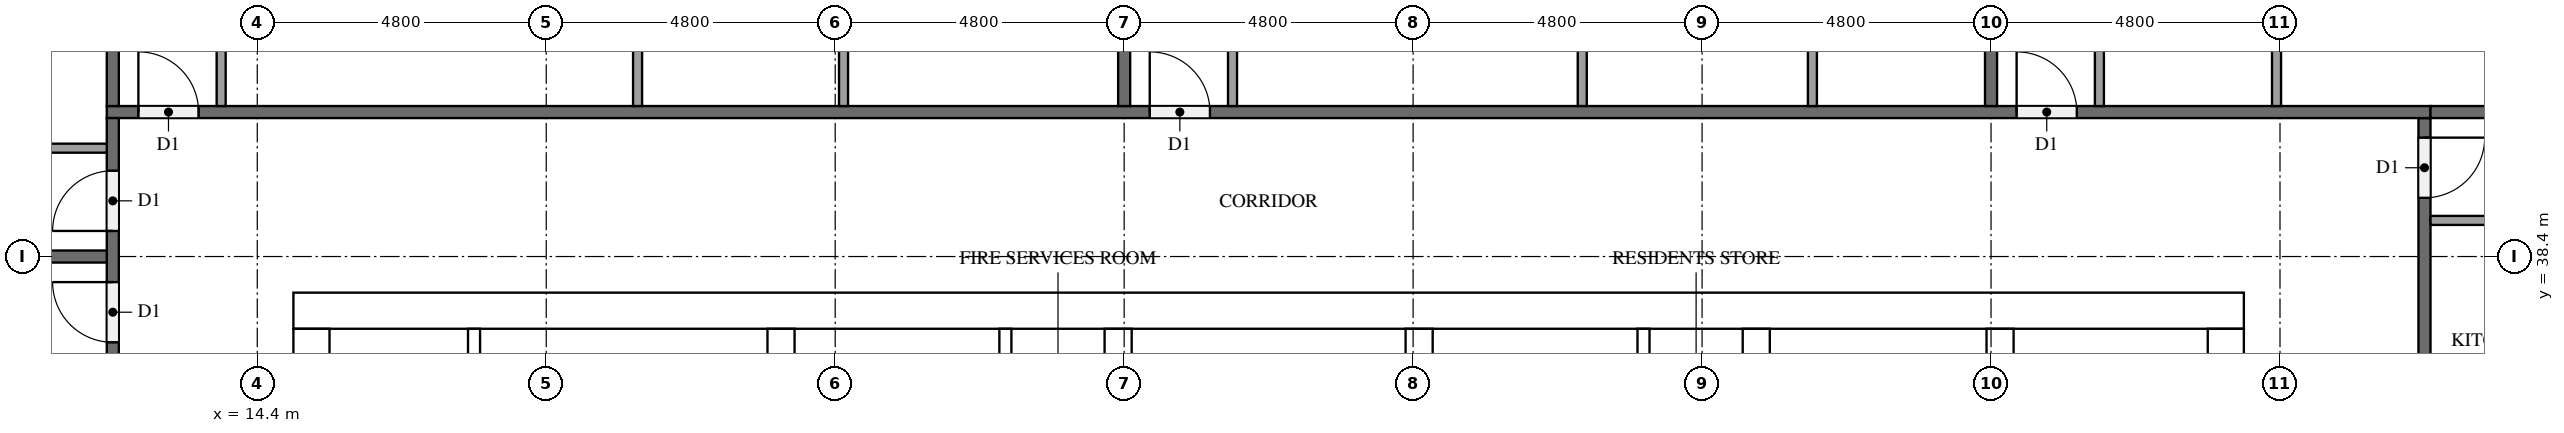
"""IFC4 building model, lengths in metres.
Left out: names, types, materials, properties, quantities, classifications, styles, units other than length and angle.
Written with IfcOpenShell. Run it as: python <this file> out.ifc"""

import sys

from ifc_helpers import new_model, si_unit, direction, frame, frame_2d, origin, place, context, subcontext, project, spatial, rectangle, extrude, element, fill, save


model = new_model("IFC4")
c1 = context("Model", 3, precision=1e-05, world=origin(), true_north=direction((0.0, 1.0)))
c2 = subcontext(c1, "Body", "Model", "MODEL_VIEW")
j1 = project(units=[si_unit("LENGTHUNIT", "METRE"), si_unit("PLANEANGLEUNIT", "RADIAN")], contexts=[c1])
p1 = place(None, origin())
s1 = spatial("IfcSite", under=j1, at=p1, CompositionType="ELEMENT")
p2 = place(p1, origin())
s2 = spatial("IfcBuilding", under=s1, at=p2, CompositionType="ELEMENT")
p3 = place(p2, frame((0.0, 0.0, 249.2)))
s3 = spatial("IfcBuildingStorey", under=s2, at=p3, CompositionType="ELEMENT", Elevation=249.2)
p4 = place(p3, frame((15.0, 37.5, 0.0), z_axis=(0.0, 0.0, 1.0), x_axis=(1.0, 0.0, 0.0)))
e1 = element("IfcWall", 1, at=p4, inside=s3, PredefinedType="SHEAR", context=c2, shape_type="SweptSolid", body=[
    extrude(rectangle(XDim=32.4, YDim=0.6, at=frame_2d((16.2, 0.0))), origin(), (0.0, 0.0, 1.0), 3.2),
])
p5 = place(p4, frame((15.3, 0.0, 0.0)))
e2 = element("IfcOpeningElement", 2, at=p5, cuts=e1, PredefinedType="OPENING", context=c2, shape_type="SweptSolid", body=[
    extrude(rectangle(XDim=1.8, YDim=2.1, at=frame_2d((0.9, 1.05))), frame((0.0, 0.31, 0.0), z_axis=(0.0, -1.0, 0.0), x_axis=(1.0, 0.0, 0.0)), (0.0, 0.0, 1.0), 0.62),
])
p6 = place(p4, frame((1.25, 0.0, 0.0)))
e3 = element("IfcOpeningElement", 3, at=p6, cuts=e1, PredefinedType="OPENING", context=c2, shape_type="SweptSolid", body=[
    extrude(rectangle(XDim=1.0, YDim=2.1, at=frame_2d((0.5, 1.05))), frame((0.0, 0.31, 0.0), z_axis=(0.0, -1.0, 0.0), x_axis=(1.0, 0.0, 0.0)), (0.0, 0.0, 1.0), 0.62),
])
p7 = place(p4, frame((4.988, 0.0, 0.0)))
e4 = element("IfcOpeningElement", 4, at=p7, cuts=e1, PredefinedType="OPENING", context=c2, shape_type="SweptSolid", body=[
    extrude(rectangle(XDim=1.0, YDim=2.1, at=frame_2d((0.5, 1.05))), frame((0.0, 0.31, 0.0), z_axis=(0.0, -1.0, 0.0), x_axis=(1.0, 0.0, 0.0)), (0.0, 0.0, 1.0), 0.62),
])
p8 = place(p3, frame((15.3, 15.6, 0.0), z_axis=(0.0, 0.0, 1.0), x_axis=(0.0, 1.0, 0.0)))
e5 = element("IfcWall", 5, at=p8, inside=s3, PredefinedType="SHEAR", context=c2, shape_type="SweptSolid", body=[
    extrude(rectangle(XDim=21.6, YDim=0.6, at=frame_2d((10.8, 0.0))), origin(), (0.0, 0.0, 1.0), 3.2),
])
p9 = place(p8, frame((5.16, 0.0, 0.0)))
e6 = element("IfcOpeningElement", 6, at=p9, cuts=e5, PredefinedType="OPENING", context=c2, shape_type="SweptSolid", body=[
    extrude(rectangle(XDim=1.2, YDim=2.1, at=frame_2d((0.6, 1.05))), frame((0.0, 0.31, 0.0), z_axis=(0.0, -1.0, 0.0), x_axis=(1.0, 0.0, 0.0)), (0.0, 0.0, 1.0), 0.62),
])
p10 = place(p3, frame((47.1, 15.6, 0.0), z_axis=(0.0, 0.0, 1.0), x_axis=(0.0, 1.0, 0.0)))
e7 = element("IfcWall", 7, at=p10, inside=s3, PredefinedType="SHEAR", context=c2, shape_type="SweptSolid", body=[
    extrude(rectangle(XDim=21.6, YDim=0.6, at=frame_2d((10.8, 0.0))), origin(), (0.0, 0.0, 1.0), 3.2),
])
p11 = place(p10, frame((10.5, 0.0, 0.0)))
e8 = element("IfcOpeningElement", 8, at=p11, cuts=e7, PredefinedType="OPENING", context=c2, shape_type="SweptSolid", body=[
    extrude(rectangle(XDim=1.2, YDim=2.1, at=frame_2d((0.6, 1.05))), frame((0.0, 0.31, 0.0), z_axis=(0.0, -1.0, 0.0), x_axis=(1.0, 0.0, 0.0)), (0.0, 0.0, 1.0), 0.62),
])
p12 = place(p3, frame((23.1, 15.6, 0.0), z_axis=(0.0, 0.0, 1.0), x_axis=(0.0, 1.0, 0.0)))
e9 = element("IfcWall", 9, at=p12, inside=s3, PredefinedType="SHEAR", context=c2, shape_type="SweptSolid", body=[
    extrude(rectangle(XDim=21.6, YDim=0.45, at=frame_2d((10.8, 0.0))), origin(), (0.0, 0.0, 1.0), 3.2),
])
p13 = place(p3, frame((39.3, 27.75, 0.0), z_axis=(0.0, 0.0, 1.0), x_axis=(0.0, 1.0, 0.0)))
e10 = element("IfcWall", 10, at=p13, inside=s3, PredefinedType="SHEAR", context=c2, shape_type="SweptSolid", body=[
    extrude(rectangle(XDim=9.45, YDim=0.45, at=frame_2d((4.725, 0.0))), origin(), (0.0, 0.0, 1.0), 3.2),
])
p14 = place(p3, frame((43.35, 27.75, 0.0), z_axis=(0.0, 0.0, 1.0), x_axis=(0.0, 1.0, 0.0)))
e11 = element("IfcWall", 11, at=p14, inside=s3, PredefinedType="SHEAR", context=c2, shape_type="SweptSolid", body=[
    extrude(rectangle(XDim=9.45, YDim=0.45, at=frame_2d((4.725, 0.0))), origin(), (0.0, 0.0, 1.0), 3.2),
])
p15 = place(p14, frame((7.65, 0.0, 0.0)))
e12 = element("IfcOpeningElement", 12, at=p15, cuts=e11, PredefinedType="OPENING", context=c2, shape_type="SweptSolid", body=[
    extrude(rectangle(XDim=1.2, YDim=2.1, at=frame_2d((0.6, 1.05))), frame((0.0, 0.235, 0.0), z_axis=(0.0, -1.0, 0.0), x_axis=(1.0, 0.0, 0.0)), (0.0, 0.0, 1.0), 0.47),
])
for number, where, z_axis, x_axis in (
    (13, (28.7, 33.775, 0.0), (0.0, 0.0, 1.0), (0.0, 1.0, 0.0)),
    (14, (33.7, 33.775, 0.0), (0.0, 0.0, 1.0), (0.0, 1.0, 0.0)),
):
    element("IfcWall", number, at=place(p3, frame(where, z_axis=z_axis, x_axis=x_axis)), inside=s3, PredefinedType="SHEAR", context=c2, shape_type="SweptSolid", body=[
        extrude(rectangle(XDim=3.425, YDim=0.45, at=frame_2d((1.712, 0.0))), origin(), (0.0, 0.0, 1.0), 3.2),
    ])
p16 = place(p3, frame((18.001, 31.475, 0.0), z_axis=(0.0, 0.0, 1.0), x_axis=(0.0, 1.0, 0.0)))
e15 = element("IfcWall", 15, at=p16, inside=s3, PredefinedType="PARTITIONING", context=c2, shape_type="SweptSolid", body=[
    extrude(rectangle(XDim=5.725, YDim=0.2, at=frame_2d((2.862, 0.0))), origin(), (0.0, 0.0, 1.0), 3.2),
])
for number, where, z_axis, x_axis in (
    (16, (26.827, 33.775, 0.0), (0.0, 0.0, 1.0), (0.0, 1.0, 0.0)),
    (17, (37.427, 33.775, 0.0), (0.0, 0.0, 1.0), (0.0, 1.0, 0.0)),
):
    element("IfcWall", number, at=place(p3, frame(where, z_axis=z_axis, x_axis=x_axis)), inside=s3, PredefinedType="PARTITIONING", context=c2, shape_type="SweptSolid", body=[
        extrude(rectangle(XDim=3.425, YDim=0.2, at=frame_2d((1.712, 0.0))), origin(), (0.0, 0.0, 1.0), 3.2),
    ])
p17 = place(p3, frame((50.4, 40.7, 0.0), z_axis=(0.0, 0.0, 1.0), x_axis=(0.0, -1.0, 0.0)))
e18 = element("IfcWall", 18, at=p17, inside=s3, PredefinedType="PARTITIONING", context=c2, shape_type="SweptSolid", body=[
    extrude(rectangle(XDim=28.6, YDim=0.2, at=frame_2d((14.3, 0.0))), origin(), (0.0, 0.0, 1.0), 3.2),
])
p18 = place(p17, frame((19.525, 0.0, 0.0)))
e19 = element("IfcOpeningElement", 19, at=p18, cuts=e18, PredefinedType="OPENING", context=c2, shape_type="SweptSolid", body=[
    extrude(rectangle(XDim=1.0, YDim=2.1, at=frame_2d((0.5, 1.05))), frame((0.0, 0.11, 0.0), z_axis=(0.0, -1.0, 0.0), x_axis=(1.0, 0.0, 0.0)), (0.0, 0.0, 1.0), 0.22),
])
p19 = place(p17, frame((17.675, 0.0, 0.0)))
e20 = element("IfcOpeningElement", 20, at=p19, cuts=e18, PredefinedType="OPENING", context=c2, shape_type="SweptSolid", body=[
    extrude(rectangle(XDim=1.0, YDim=2.1, at=frame_2d((0.5, 1.05))), frame((0.0, 0.11, 0.0), z_axis=(0.0, -1.0, 0.0), x_axis=(1.0, 0.0, 0.0)), (0.0, 0.0, 1.0), 0.22),
])
p20 = place(p17, frame((0.325, 0.0, 0.0)))
e21 = element("IfcOpeningElement", 21, at=p20, cuts=e18, PredefinedType="OPENING", context=c2, shape_type="SweptSolid", body=[
    extrude(rectangle(XDim=1.0, YDim=2.1, at=frame_2d((0.5, 1.05))), frame((0.0, 0.11, 0.0), z_axis=(0.0, -1.0, 0.0), x_axis=(1.0, 0.0, 0.0)), (0.0, 0.0, 1.0), 0.22),
])
p21 = place(p3, frame((11.9, 40.8, 0.0), z_axis=(0.0, 0.0, 1.0), x_axis=(1.0, 0.0, 0.0)))
e22 = element("IfcWall", 22, at=p21, inside=s3, PredefinedType="PARTITIONING", context=c2, shape_type="SweptSolid", body=[
    extrude(rectangle(XDim=38.6, YDim=0.2, at=frame_2d((19.3, 0.0))), origin(), (0.0, 0.0, 1.0), 3.2),
])
p22 = place(p21, frame((31.725, 0.0, 0.0)))
e23 = element("IfcOpeningElement", 23, at=p22, cuts=e22, PredefinedType="OPENING", context=c2, shape_type="SweptSolid", body=[
    extrude(rectangle(XDim=1.0, YDim=2.1, at=frame_2d((0.5, 1.05))), frame((0.0, 0.11, 0.0), z_axis=(0.0, -1.0, 0.0), x_axis=(1.0, 0.0, 0.0)), (0.0, 0.0, 1.0), 0.22),
])
p23 = place(p21, frame((17.325, 0.0, 0.0)))
e24 = element("IfcOpeningElement", 24, at=p23, cuts=e22, PredefinedType="OPENING", context=c2, shape_type="SweptSolid", body=[
    extrude(rectangle(XDim=1.0, YDim=2.1, at=frame_2d((0.5, 1.05))), frame((0.0, 0.11, 0.0), z_axis=(0.0, -1.0, 0.0), x_axis=(1.0, 0.0, 0.0)), (0.0, 0.0, 1.0), 0.22),
])
p24 = place(p21, frame((0.525, 0.0, 0.0)))
e25 = element("IfcOpeningElement", 25, at=p24, cuts=e22, PredefinedType="OPENING", context=c2, shape_type="SweptSolid", body=[
    extrude(rectangle(XDim=1.0, YDim=2.1, at=frame_2d((0.5, 1.05))), frame((0.0, 0.11, 0.0), z_axis=(0.0, -1.0, 0.0), x_axis=(1.0, 0.0, 0.0)), (0.0, 0.0, 1.0), 0.22),
])
p25 = place(p3, frame((12.0, 12.1, 0.0), z_axis=(0.0, 0.0, 1.0), x_axis=(0.0, 1.0, 0.0)))
e26 = element("IfcWall", 26, at=p25, inside=s3, PredefinedType="PARTITIONING", context=c2, shape_type="SweptSolid", body=[
    extrude(rectangle(XDim=28.6, YDim=0.2, at=frame_2d((14.3, 0.0))), origin(), (0.0, 0.0, 1.0), 3.2),
])
p26 = place(p25, frame((26.725, 0.0, 0.0)))
e27 = element("IfcOpeningElement", 27, at=p26, cuts=e26, PredefinedType="OPENING", context=c2, shape_type="SweptSolid", body=[
    extrude(rectangle(XDim=1.0, YDim=2.1, at=frame_2d((0.5, 1.05))), frame((0.0, 0.11, 0.0), z_axis=(0.0, -1.0, 0.0), x_axis=(1.0, 0.0, 0.0)), (0.0, 0.0, 1.0), 0.22),
])
p27 = place(p25, frame((24.875, 0.0, 0.0)))
e28 = element("IfcOpeningElement", 28, at=p27, cuts=e26, PredefinedType="OPENING", context=c2, shape_type="SweptSolid", body=[
    extrude(rectangle(XDim=1.0, YDim=2.1, at=frame_2d((0.5, 1.05))), frame((0.0, 0.11, 0.0), z_axis=(0.0, -1.0, 0.0), x_axis=(1.0, 0.0, 0.0)), (0.0, 0.0, 1.0), 0.22),
])
p28 = place(p25, frame((17.675, 0.0, 0.0)))
e29 = element("IfcOpeningElement", 29, at=p28, cuts=e26, PredefinedType="OPENING", context=c2, shape_type="SweptSolid", body=[
    extrude(rectangle(XDim=1.0, YDim=2.1, at=frame_2d((0.5, 1.05))), frame((0.0, 0.11, 0.0), z_axis=(0.0, -1.0, 0.0), x_axis=(1.0, 0.0, 0.0)), (0.0, 0.0, 1.0), 0.22),
])
p29 = place(p25, frame((2.725, 0.0, 0.0)))
e30 = element("IfcOpeningElement", 30, at=p29, cuts=e26, PredefinedType="OPENING", context=c2, shape_type="SweptSolid", body=[
    extrude(rectangle(XDim=1.0, YDim=2.1, at=frame_2d((0.5, 1.05))), frame((0.0, 0.11, 0.0), z_axis=(0.0, -1.0, 0.0), x_axis=(1.0, 0.0, 0.0)), (0.0, 0.0, 1.0), 0.22),
])
p30 = place(p25, frame((0.875, 0.0, 0.0)))
e31 = element("IfcOpeningElement", 31, at=p30, cuts=e26, PredefinedType="OPENING", context=c2, shape_type="SweptSolid", body=[
    extrude(rectangle(XDim=1.0, YDim=2.1, at=frame_2d((0.5, 1.05))), frame((0.0, 0.11, 0.0), z_axis=(0.0, -1.0, 0.0), x_axis=(1.0, 0.0, 0.0)), (0.0, 0.0, 1.0), 0.22),
])
p31 = place(p3, frame((50.5, 40.8, 0.0), z_axis=(0.0, 0.0, 1.0), x_axis=(1.0, 0.0, 0.0)))
e32 = element("IfcWall", 32, at=p31, inside=s3, PredefinedType="PARTITIONING", context=c2, shape_type="SweptSolid", body=[
    extrude(rectangle(XDim=7.0, YDim=0.2, at=frame_2d((3.5, 0.0))), origin(), (0.0, 0.0, 1.0), 3.2),
])
p32 = place(p3, frame((43.2, 52.525, 0.0), z_axis=(0.0, 0.0, 1.0), x_axis=(0.0, -1.0, 0.0)))
e33 = element("IfcWall", 33, at=p32, inside=s3, PredefinedType="PARTITIONING", context=c2, shape_type="SweptSolid", body=[
    extrude(rectangle(XDim=11.625, YDim=0.2, at=frame_2d((5.812, 0.0))), origin(), (0.0, 0.0, 1.0), 3.2),
])
for number, where, z_axis, x_axis in (
    (34, (28.8, 52.7, 0.0), (0.0, 0.0, 1.0), (0.0, -1.0, 0.0)),
    (35, (12.0, 52.7, 0.0), (0.0, 0.0, 1.0), (0.0, -1.0, 0.0)),
):
    element("IfcWall", number, at=place(p3, frame(where, z_axis=z_axis, x_axis=x_axis)), inside=s3, PredefinedType="PARTITIONING", context=c2, shape_type="SweptSolid", body=[
        extrude(rectangle(XDim=11.8, YDim=0.2, at=frame_2d((5.9, 0.0))), origin(), (0.0, 0.0, 1.0), 3.2),
    ])
p33 = place(p3, frame((0.275, 38.4, 0.0), z_axis=(0.0, 0.0, 1.0), x_axis=(1.0, 0.0, 0.0)))
e36 = element("IfcWall", 36, at=p33, inside=s3, PredefinedType="PARTITIONING", context=c2, shape_type="SweptSolid", body=[
    extrude(rectangle(XDim=11.625, YDim=0.2, at=frame_2d((5.812, 0.0))), origin(), (0.0, 0.0, 1.0), 3.2),
])
p34 = place(p3, frame((50.5, 39.0, 0.0), z_axis=(0.0, 0.0, 1.0), x_axis=(1.0, 0.0, 0.0)))
e37 = element("IfcWall", 37, at=p34, inside=s3, PredefinedType="PARTITIONING", context=c2, shape_type="SweptSolid", body=[
    extrude(rectangle(XDim=2.225, YDim=0.15, at=frame_2d((1.113, 0.0))), origin(), (0.0, 0.0, 1.0), 3.2),
])
p35 = place(p3, frame((47.942, 40.9, 0.0), z_axis=(0.0, 0.0, 1.0), x_axis=(0.0, 1.0, 0.0)))
e38 = element("IfcWall", 38, at=p35, inside=s3, PredefinedType="PARTITIONING", context=c2, shape_type="SweptSolid", body=[
    extrude(rectangle(XDim=2.975, YDim=0.15, at=frame_2d((1.488, 0.0))), origin(), (0.0, 0.0, 1.0), 3.2),
])
p36 = place(p3, frame((45.0, 40.9, 0.0), z_axis=(0.0, 0.0, 1.0), x_axis=(0.0, 1.0, 0.0)))
e39 = element("IfcWall", 39, at=p36, inside=s3, PredefinedType="PARTITIONING", context=c2, shape_type="SweptSolid", body=[
    extrude(rectangle(XDim=3.125, YDim=0.15, at=frame_2d((1.562, 0.0))), origin(), (0.0, 0.0, 1.0), 3.2),
])
for number, where, z_axis, x_axis in (
    (40, (36.41, 40.9, 0.0), (0.0, 0.0, 1.0), (0.0, 1.0, 0.0)),
    (41, (40.233, 40.9, 0.0), (0.0, 0.0, 1.0), (0.0, 1.0, 0.0)),
):
    element("IfcWall", number, at=place(p3, frame(where, z_axis=z_axis, x_axis=x_axis)), inside=s3, PredefinedType="PARTITIONING", context=c2, shape_type="SweptSolid", body=[
        extrude(rectangle(XDim=2.975, YDim=0.15, at=frame_2d((1.488, 0.0))), origin(), (0.0, 0.0, 1.0), 3.2),
    ])
p37 = place(p3, frame((30.6, 40.9, 0.0), z_axis=(0.0, 0.0, 1.0), x_axis=(0.0, 1.0, 0.0)))
e42 = element("IfcWall", 42, at=p37, inside=s3, PredefinedType="PARTITIONING", context=c2, shape_type="SweptSolid", body=[
    extrude(rectangle(XDim=3.125, YDim=0.15, at=frame_2d((1.562, 0.0))), origin(), (0.0, 0.0, 1.0), 3.2),
])
for number, where, z_axis, x_axis in (
    (43, (20.717, 40.9, 0.0), (0.0, 0.0, 1.0), (0.0, 1.0, 0.0)),
    (44, (24.138, 40.9, 0.0), (0.0, 0.0, 1.0), (0.0, 1.0, 0.0)),
):
    element("IfcWall", number, at=place(p3, frame(where, z_axis=z_axis, x_axis=x_axis)), inside=s3, PredefinedType="PARTITIONING", context=c2, shape_type="SweptSolid", body=[
        extrude(rectangle(XDim=4.325, YDim=0.15, at=frame_2d((2.163, 0.0))), origin(), (0.0, 0.0, 1.0), 3.2),
    ])
p38 = place(p3, frame((13.8, 40.9, 0.0), z_axis=(0.0, 0.0, 1.0), x_axis=(0.0, 1.0, 0.0)))
e45 = element("IfcWall", 45, at=p38, inside=s3, PredefinedType="PARTITIONING", context=c2, shape_type="SweptSolid", body=[
    extrude(rectangle(XDim=4.475, YDim=0.15, at=frame_2d((2.238, 0.0))), origin(), (0.0, 0.0, 1.0), 3.2),
])
p39 = place(p3, frame((11.9, 40.2, 0.0), z_axis=(0.0, 0.0, 1.0), x_axis=(-1.0, 0.0, 0.0)))
e46 = element("IfcWall", 46, at=p39, inside=s3, PredefinedType="PARTITIONING", context=c2, shape_type="SweptSolid", body=[
    extrude(rectangle(XDim=3.425, YDim=0.15, at=frame_2d((1.712, 0.0))), origin(), (0.0, 0.0, 1.0), 3.2),
])
p40 = place(p5, origin())
e47 = element("IfcDoor", 47, at=p40, inside=s3, OperationType="DOUBLE_DOOR_SINGLE_SWING", PredefinedType="DOOR", context=c2, shape_type="SweptSolid", body=[
    extrude(rectangle(XDim=1.8, YDim=2.1, at=frame_2d((0.9, 1.05))), frame((0.0, 0.025, 0.0), z_axis=(0.0, -1.0, 0.0), x_axis=(1.0, 0.0, 0.0)), (0.0, 0.0, 1.0), 0.05),
])
fill(e2, e47)
p41 = place(p6, origin())
e48 = element("IfcDoor", 48, at=p41, inside=s3, OperationType="SINGLE_SWING_RIGHT", PredefinedType="DOOR", context=c2, shape_type="SweptSolid", body=[
    extrude(rectangle(XDim=1.0, YDim=2.1, at=frame_2d((0.5, 1.05))), frame((0.0, 0.025, 0.0), z_axis=(0.0, -1.0, 0.0), x_axis=(1.0, 0.0, 0.0)), (0.0, 0.0, 1.0), 0.05),
])
fill(e3, e48)
p42 = place(p7, origin())
e49 = element("IfcDoor", 49, at=p42, inside=s3, OperationType="SINGLE_SWING_LEFT", PredefinedType="DOOR", context=c2, shape_type="SweptSolid", body=[
    extrude(rectangle(XDim=1.0, YDim=2.1, at=frame_2d((0.5, 1.05))), frame((0.0, 0.025, 0.0), z_axis=(0.0, -1.0, 0.0), x_axis=(1.0, 0.0, 0.0)), (0.0, 0.0, 1.0), 0.05),
])
fill(e4, e49)
p43 = place(p20, origin())
e50 = element("IfcDoor", 50, at=p43, inside=s3, OperationType="SINGLE_SWING_LEFT", PredefinedType="DOOR", context=c2, shape_type="SweptSolid", body=[
    extrude(rectangle(XDim=1.0, YDim=2.1, at=frame_2d((0.5, 1.05))), frame((0.0, 0.025, 0.0), z_axis=(0.0, -1.0, 0.0), x_axis=(1.0, 0.0, 0.0)), (0.0, 0.0, 1.0), 0.05),
])
fill(e21, e50)
p44 = place(p22, origin())
e51 = element("IfcDoor", 51, at=p44, inside=s3, OperationType="SINGLE_SWING_LEFT", PredefinedType="DOOR", context=c2, shape_type="SweptSolid", body=[
    extrude(rectangle(XDim=1.0, YDim=2.1, at=frame_2d((0.5, 1.05))), frame((0.0, 0.025, 0.0), z_axis=(0.0, -1.0, 0.0), x_axis=(1.0, 0.0, 0.0)), (0.0, 0.0, 1.0), 0.05),
])
fill(e23, e51)
p45 = place(p23, origin())
e52 = element("IfcDoor", 52, at=p45, inside=s3, OperationType="SINGLE_SWING_LEFT", PredefinedType="DOOR", context=c2, shape_type="SweptSolid", body=[
    extrude(rectangle(XDim=1.0, YDim=2.1, at=frame_2d((0.5, 1.05))), frame((0.0, 0.025, 0.0), z_axis=(0.0, -1.0, 0.0), x_axis=(1.0, 0.0, 0.0)), (0.0, 0.0, 1.0), 0.05),
])
fill(e24, e52)
p46 = place(p24, origin())
e53 = element("IfcDoor", 53, at=p46, inside=s3, OperationType="SINGLE_SWING_LEFT", PredefinedType="DOOR", context=c2, shape_type="SweptSolid", body=[
    extrude(rectangle(XDim=1.0, YDim=2.1, at=frame_2d((0.5, 1.05))), frame((0.0, 0.025, 0.0), z_axis=(0.0, -1.0, 0.0), x_axis=(1.0, 0.0, 0.0)), (0.0, 0.0, 1.0), 0.05),
])
fill(e25, e53)
p47 = place(p26, origin())
e54 = element("IfcDoor", 54, at=p47, inside=s3, OperationType="SINGLE_SWING_LEFT", PredefinedType="DOOR", context=c2, shape_type="SweptSolid", body=[
    extrude(rectangle(XDim=1.0, YDim=2.1, at=frame_2d((0.5, 1.05))), frame((0.0, 0.025, 0.0), z_axis=(0.0, -1.0, 0.0), x_axis=(1.0, 0.0, 0.0)), (0.0, 0.0, 1.0), 0.05),
])
fill(e27, e54)
p48 = place(p27, origin())
e55 = element("IfcDoor", 55, at=p48, inside=s3, OperationType="SINGLE_SWING_RIGHT", PredefinedType="DOOR", context=c2, shape_type="SweptSolid", body=[
    extrude(rectangle(XDim=1.0, YDim=2.1, at=frame_2d((0.5, 1.05))), frame((0.0, 0.025, 0.0), z_axis=(0.0, -1.0, 0.0), x_axis=(1.0, 0.0, 0.0)), (0.0, 0.0, 1.0), 0.05),
])
fill(e28, e55)
save(model, sys.argv[1])
